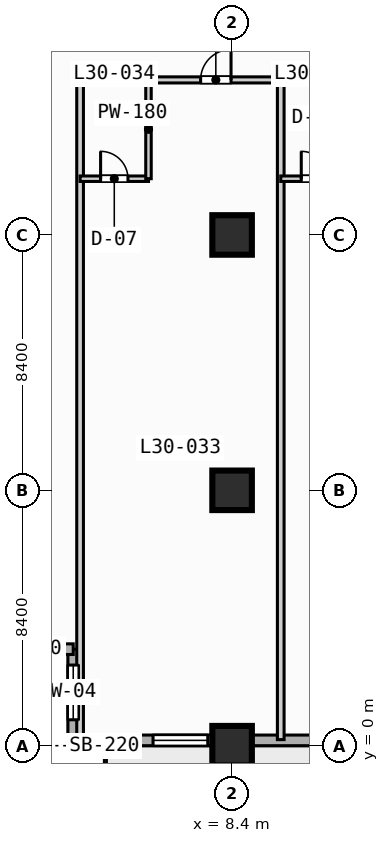
"""IFC4 building model, lengths in metres.
Left out: names, types, materials, properties, quantities, classifications, styles, units other than length and angle.
Written with IfcOpenShell. Run it as: python <this file> out.ifc"""

import sys

from ifc_helpers import new_model, si_unit, direction, frame, frame_2d, origin, origin_2d, place, context, subcontext, project, spatial, rectangle, extrude, element, fill, save


model = new_model("IFC4")
c1 = context("Model", 3, precision=1e-05, world=origin(), true_north=direction((0.0, 1.0)))
c2 = subcontext(c1, "Body", "Model", "MODEL_VIEW")
j1 = project(units=[si_unit("LENGTHUNIT", "METRE"), si_unit("PLANEANGLEUNIT", "RADIAN")], contexts=[c1])
p1 = place(None, origin())
s1 = spatial("IfcSite", under=j1, at=p1, CompositionType="ELEMENT")
p2 = place(p1, origin())
s2 = spatial("IfcBuilding", under=s1, at=p2, CompositionType="ELEMENT")
p3 = place(p2, frame((0.0, 0.0, 126.6)))
s3 = spatial("IfcBuildingStorey", under=s2, at=p3, CompositionType="ELEMENT", Elevation=126.6)
for number, where, z_axis, x_axis in (
    (1, (8.4, 0.0, 0.0), (0.0, 0.0, 1.0), (1.0, 0.0, 0.0)),
    (2, (8.4, 8.4, 0.0), (0.0, 0.0, 1.0), (1.0, 0.0, 0.0)),
    (3, (8.4, 16.8, 0.0), (0.0, 0.0, 1.0), (1.0, 0.0, 0.0)),
):
    element("IfcColumn", number, at=place(p3, frame(where, z_axis=z_axis, x_axis=x_axis)), inside=s3, PredefinedType="COLUMN", context=c2, shape_type="SweptSolid", body=[
        extrude(rectangle(XDim=1.3, YDim=1.3, at=origin_2d()), origin(), (0.0, 0.0, 1.0), 3.8),
    ])
p4 = place(p3, frame((3.175, 0.175, 0.0), z_axis=(0.0, 0.0, 1.0), x_axis=(0.0, 1.0, 0.0)))
e4 = element("IfcWall", 4, at=p4, inside=s3, PredefinedType="STANDARD", context=c2, shape_type="SweptSolid", body=[
    extrude(rectangle(XDim=3.0, YDim=0.35, at=frame_2d((1.5, 0.0))), origin(), (0.0, 0.0, 1.0), 3.55),
])
p5 = place(p4, frame((0.677, 0.0, 0.85)))
e5 = element("IfcOpeningElement", 5, at=p5, cuts=e4, PredefinedType="OPENING", context=c2, shape_type="SweptSolid", body=[
    extrude(rectangle(XDim=1.8, YDim=1.8, at=frame_2d((0.9, 0.9))), frame((0.0, 0.185, 0.0), z_axis=(0.0, -1.0, 0.0), x_axis=(1.0, 0.0, 0.0)), (0.0, 0.0, 1.0), 0.37),
])
p6 = place(p3, frame((3.175, 3.175, 0.0), z_axis=(0.0, 0.0, 1.0), x_axis=(-1.0, 0.0, 0.0)))
e6 = element("IfcWall", 6, at=p6, inside=s3, PredefinedType="STANDARD", context=c2, shape_type="SweptSolid", body=[
    extrude(rectangle(XDim=3.0, YDim=0.35, at=frame_2d((1.5, 0.0))), origin(), (0.0, 0.0, 1.0), 3.55),
])
p7 = place(p3, frame((72.425, 0.175, 0.0), z_axis=(0.0, 0.0, 1.0), x_axis=(-1.0, 0.0, 0.0)))
e7 = element("IfcWall", 7, at=p7, inside=s3, PredefinedType="STANDARD", context=c2, shape_type="SweptSolid", body=[
    extrude(rectangle(XDim=69.25, YDim=0.35, at=frame_2d((34.625, 0.0))), origin(), (0.0, 0.0, 1.0), 3.55),
])
p8 = place(p7, frame((50.725, 0.0, 0.0)))
e8 = element("IfcOpeningElement", 8, at=p8, cuts=e7, PredefinedType="OPENING", context=c2, shape_type="SweptSolid", body=[
    extrude(rectangle(XDim=1.4, YDim=2.2, at=frame_2d((0.7, 1.1))), frame((0.0, 0.185, 0.0), z_axis=(0.0, -1.0, 0.0), x_axis=(1.0, 0.0, 0.0)), (0.0, 0.0, 1.0), 0.37),
])
p9 = place(p7, frame((58.725, 0.0, 0.85)))
e9 = element("IfcOpeningElement", 9, at=p9, cuts=e7, PredefinedType="OPENING", context=c2, shape_type="SweptSolid", body=[
    extrude(rectangle(XDim=2.2, YDim=1.8, at=frame_2d((1.1, 0.9))), frame((0.0, 0.185, 0.0), z_axis=(0.0, -1.0, 0.0), x_axis=(1.0, 0.0, 0.0)), (0.0, 0.0, 1.0), 0.37),
])
p10 = place(p7, frame((41.925, 0.0, 0.85)))
e10 = element("IfcOpeningElement", 10, at=p10, cuts=e7, PredefinedType="OPENING", context=c2, shape_type="SweptSolid", body=[
    extrude(rectangle(XDim=2.2, YDim=1.8, at=frame_2d((1.1, 0.9))), frame((0.0, 0.185, 0.0), z_axis=(0.0, -1.0, 0.0), x_axis=(1.0, 0.0, 0.0)), (0.0, 0.0, 1.0), 0.37),
])
p11 = place(p7, frame((33.525, 0.0, 0.85)))
e11 = element("IfcOpeningElement", 11, at=p11, cuts=e7, PredefinedType="OPENING", context=c2, shape_type="SweptSolid", body=[
    extrude(rectangle(XDim=2.2, YDim=1.8, at=frame_2d((1.1, 0.9))), frame((0.0, 0.185, 0.0), z_axis=(0.0, -1.0, 0.0), x_axis=(1.0, 0.0, 0.0)), (0.0, 0.0, 1.0), 0.37),
])
p12 = place(p7, frame((25.125, 0.0, 0.85)))
e12 = element("IfcOpeningElement", 12, at=p12, cuts=e7, PredefinedType="OPENING", context=c2, shape_type="SweptSolid", body=[
    extrude(rectangle(XDim=2.2, YDim=1.8, at=frame_2d((1.1, 0.9))), frame((0.0, 0.185, 0.0), z_axis=(0.0, -1.0, 0.0), x_axis=(1.0, 0.0, 0.0)), (0.0, 0.0, 1.0), 0.37),
])
p13 = place(p7, frame((64.825, 0.0, 0.85)))
e13 = element("IfcOpeningElement", 13, at=p13, cuts=e7, PredefinedType="OPENING", context=c2, shape_type="SweptSolid", body=[
    extrude(rectangle(XDim=1.8, YDim=1.8, at=frame_2d((0.9, 0.9))), frame((0.0, 0.185, 0.0), z_axis=(0.0, -1.0, 0.0), x_axis=(1.0, 0.0, 0.0)), (0.0, 0.0, 1.0), 0.37),
])
p14 = place(p7, frame((48.025, 0.0, 0.85)))
e14 = element("IfcOpeningElement", 14, at=p14, cuts=e7, PredefinedType="OPENING", context=c2, shape_type="SweptSolid", body=[
    extrude(rectangle(XDim=1.8, YDim=1.8, at=frame_2d((0.9, 0.9))), frame((0.0, 0.185, 0.0), z_axis=(0.0, -1.0, 0.0), x_axis=(1.0, 0.0, 0.0)), (0.0, 0.0, 1.0), 0.37),
])
p15 = place(p3, frame((3.4, 21.9, 0.0), z_axis=(0.0, 0.0, 1.0), x_axis=(1.0, 0.0, 0.0)))
e15 = element("IfcWall", 15, at=p15, inside=s3, PredefinedType="PARTITIONING", context=c2, shape_type="SweptSolid", body=[
    extrude(rectangle(XDim=35.8, YDim=0.2, at=frame_2d((17.9, 0.0))), origin(), (0.0, 0.0, 1.0), 3.55),
])
p16 = place(p15, frame((3.965, 0.0, 0.0)))
e16 = element("IfcOpeningElement", 16, at=p16, cuts=e15, PredefinedType="OPENING", context=c2, shape_type="SweptSolid", body=[
    extrude(rectangle(XDim=1.0, YDim=2.15, at=frame_2d((0.5, 1.075))), frame((0.0, 0.11, 0.0), z_axis=(0.0, -1.0, 0.0), x_axis=(1.0, 0.0, 0.0)), (0.0, 0.0, 1.0), 0.22),
])
p17 = place(p15, frame((10.565, 0.0, 0.0)))
e17 = element("IfcOpeningElement", 17, at=p17, cuts=e15, PredefinedType="OPENING", context=c2, shape_type="SweptSolid", body=[
    extrude(rectangle(XDim=1.0, YDim=2.15, at=frame_2d((0.5, 1.075))), frame((0.0, 0.11, 0.0), z_axis=(0.0, -1.0, 0.0), x_axis=(1.0, 0.0, 0.0)), (0.0, 0.0, 1.0), 0.22),
])
p18 = place(p15, frame((14.34, 0.0, 0.0)))
e18 = element("IfcOpeningElement", 18, at=p18, cuts=e15, PredefinedType="OPENING", context=c2, shape_type="SweptSolid", body=[
    extrude(rectangle(XDim=1.0, YDim=2.15, at=frame_2d((0.5, 1.075))), frame((0.0, 0.11, 0.0), z_axis=(0.0, -1.0, 0.0), x_axis=(1.0, 0.0, 0.0)), (0.0, 0.0, 1.0), 0.22),
])
p19 = place(p15, frame((22.26, 0.0, 0.0)))
e19 = element("IfcOpeningElement", 19, at=p19, cuts=e15, PredefinedType="OPENING", context=c2, shape_type="SweptSolid", body=[
    extrude(rectangle(XDim=1.0, YDim=2.15, at=frame_2d((0.5, 1.075))), frame((0.0, 0.11, 0.0), z_axis=(0.0, -1.0, 0.0), x_axis=(1.0, 0.0, 0.0)), (0.0, 0.0, 1.0), 0.22),
])
p20 = place(p15, frame((27.915, 0.0, 0.0)))
e20 = element("IfcOpeningElement", 20, at=p20, cuts=e15, PredefinedType="OPENING", context=c2, shape_type="SweptSolid", body=[
    extrude(rectangle(XDim=1.0, YDim=2.15, at=frame_2d((0.5, 1.075))), frame((0.0, 0.11, 0.0), z_axis=(0.0, -1.0, 0.0), x_axis=(1.0, 0.0, 0.0)), (0.0, 0.0, 1.0), 0.22),
])
p21 = place(p15, frame((31.285, 0.0, 0.0)))
e21 = element("IfcOpeningElement", 21, at=p21, cuts=e15, PredefinedType="OPENING", context=c2, shape_type="SweptSolid", body=[
    extrude(rectangle(XDim=1.0, YDim=2.15, at=frame_2d((0.5, 1.075))), frame((0.0, 0.11, 0.0), z_axis=(0.0, -1.0, 0.0), x_axis=(1.0, 0.0, 0.0)), (0.0, 0.0, 1.0), 0.22),
])
p22 = place(p3, frame((3.4, 0.2, 0.0), z_axis=(0.0, 0.0, 1.0), x_axis=(0.0, 1.0, 0.0)))
e22 = element("IfcWall", 22, at=p22, inside=s3, PredefinedType="PARTITIONING", context=c2, shape_type="SweptSolid", body=[
    extrude(rectangle(XDim=21.88, YDim=0.22, at=frame_2d((10.94, 0.0))), origin(), (0.0, 0.0, 1.0), 3.55),
])
p23 = place(p3, frame((3.4, 18.65, 0.0), z_axis=(0.0, 0.0, 1.0), x_axis=(1.0, 0.0, 0.0)))
e23 = element("IfcWall", 23, at=p23, inside=s3, PredefinedType="PLUMBINGWALL", context=c2, shape_type="SweptSolid", body=[
    extrude(rectangle(XDim=2.25, YDim=0.18, at=frame_2d((1.125, 0.0))), origin(), (0.0, 0.0, 1.0), 3.55),
])
p24 = place(p23, frame((0.675, 0.0, 0.0)))
e24 = element("IfcOpeningElement", 24, at=p24, cuts=e23, PredefinedType="OPENING", context=c2, shape_type="SweptSolid", body=[
    extrude(rectangle(XDim=0.9, YDim=2.1, at=frame_2d((0.45, 1.05))), frame((0.0, 0.1, 0.0), z_axis=(0.0, -1.0, 0.0), x_axis=(1.0, 0.0, 0.0)), (0.0, 0.0, 1.0), 0.2),
])
p25 = place(p3, frame((5.65, 18.65, 0.0), z_axis=(0.0, 0.0, 1.0), x_axis=(0.0, 1.0, 0.0)))
e25 = element("IfcWall", 25, at=p25, inside=s3, PredefinedType="PLUMBINGWALL", context=c2, shape_type="SweptSolid", body=[
    extrude(rectangle(XDim=3.25, YDim=0.18, at=frame_2d((1.625, 0.0))), origin(), (0.0, 0.0, 1.0), 3.55),
])
p26 = place(p3, frame((10.0, 0.2, 0.0), z_axis=(0.0, 0.0, 1.0), x_axis=(0.0, 1.0, 0.0)))
e26 = element("IfcWall", 26, at=p26, inside=s3, PredefinedType="PARTITIONING", context=c2, shape_type="SweptSolid", body=[
    extrude(rectangle(XDim=21.88, YDim=0.22, at=frame_2d((10.94, 0.0))), origin(), (0.0, 0.0, 1.0), 3.55),
])
p27 = place(p3, frame((10.0, 18.65, 0.0), z_axis=(0.0, 0.0, 1.0), x_axis=(1.0, 0.0, 0.0)))
e27 = element("IfcWall", 27, at=p27, inside=s3, PredefinedType="PLUMBINGWALL", context=c2, shape_type="SweptSolid", body=[
    extrude(rectangle(XDim=2.25, YDim=0.18, at=frame_2d((1.125, 0.0))), origin(), (0.0, 0.0, 1.0), 3.55),
])
p28 = place(p27, frame((0.675, 0.0, 0.0)))
e28 = element("IfcOpeningElement", 28, at=p28, cuts=e27, PredefinedType="OPENING", context=c2, shape_type="SweptSolid", body=[
    extrude(rectangle(XDim=0.9, YDim=2.1, at=frame_2d((0.45, 1.05))), frame((0.0, 0.1, 0.0), z_axis=(0.0, -1.0, 0.0), x_axis=(1.0, 0.0, 0.0)), (0.0, 0.0, 1.0), 0.2),
])
p29 = place(p5, origin())
e29 = element("IfcWindow", 29, at=p29, inside=s3, PartitioningType="SINGLE_PANEL", PredefinedType="WINDOW", context=c2, shape_type="SweptSolid", body=[
    extrude(rectangle(XDim=1.8, YDim=1.8, at=frame_2d((0.9, 0.9))), frame((0.0, 0.03, 0.0), z_axis=(0.0, -1.0, 0.0), x_axis=(1.0, 0.0, 0.0)), (0.0, 0.0, 1.0), 0.06),
])
fill(e5, e29)
p30 = place(p13, origin())
e30 = element("IfcWindow", 30, at=p30, inside=s3, PartitioningType="SINGLE_PANEL", PredefinedType="WINDOW", context=c2, shape_type="SweptSolid", body=[
    extrude(rectangle(XDim=1.8, YDim=1.8, at=frame_2d((0.9, 0.9))), frame((0.0, 0.03, 0.0), z_axis=(0.0, -1.0, 0.0), x_axis=(1.0, 0.0, 0.0)), (0.0, 0.0, 1.0), 0.06),
])
fill(e13, e30)
p31 = place(p16, origin())
e31 = element("IfcDoor", 31, at=p31, inside=s3, OperationType="SINGLE_SWING_RIGHT", PredefinedType="DOOR", context=c2, shape_type="SweptSolid", body=[
    extrude(rectangle(XDim=1.0, YDim=2.15, at=frame_2d((0.5, 1.075))), frame((0.0, 0.025, 0.0), z_axis=(0.0, -1.0, 0.0), x_axis=(1.0, 0.0, 0.0)), (0.0, 0.0, 1.0), 0.05),
])
fill(e16, e31)
p32 = place(p24, origin())
e32 = element("IfcDoor", 32, at=p32, inside=s3, OperationType="SINGLE_SWING_LEFT", PredefinedType="DOOR", context=c2, shape_type="SweptSolid", body=[
    extrude(rectangle(XDim=0.9, YDim=2.1, at=frame_2d((0.45, 1.05))), frame((0.0, 0.025, 0.0), z_axis=(0.0, -1.0, 0.0), x_axis=(1.0, 0.0, 0.0)), (0.0, 0.0, 1.0), 0.05),
])
fill(e24, e32)
p33 = place(p28, origin())
e33 = element("IfcDoor", 33, at=p33, inside=s3, OperationType="SINGLE_SWING_LEFT", PredefinedType="DOOR", context=c2, shape_type="SweptSolid", body=[
    extrude(rectangle(XDim=0.9, YDim=2.1, at=frame_2d((0.45, 1.05))), frame((0.0, 0.025, 0.0), z_axis=(0.0, -1.0, 0.0), x_axis=(1.0, 0.0, 0.0)), (0.0, 0.0, 1.0), 0.05),
])
fill(e28, e33)
save(model, sys.argv[1])
